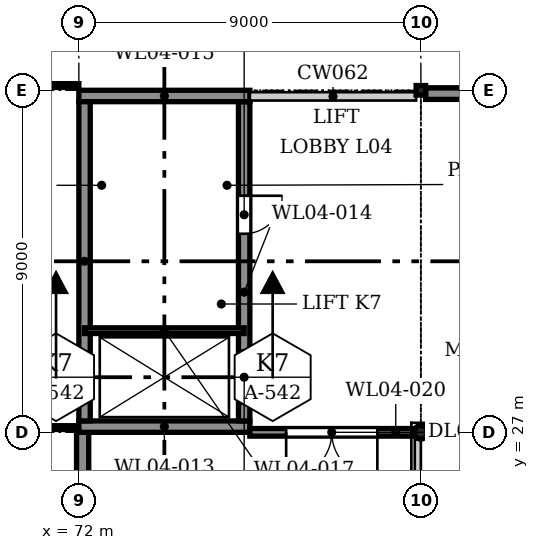
"""IFC4 building model, lengths in metres.
Left out: names, types, materials, properties, quantities, classifications, styles, units other than length and angle.
Written with IfcOpenShell. Run it as: python <this file> out.ifc"""

import sys

from ifc_helpers import new_model, si_unit, direction, frame, frame_2d, origin, origin_2d, place, context, subcontext, project, spatial, polyline, rectangle, hollow_rectangle, hollow_circle, outline, extrude, element, fill, save


model = new_model("IFC4")
c1 = context("Model", 3, precision=1e-05, world=origin(), true_north=direction((0.0, 1.0)))
c2 = subcontext(c1, "Body", "Model", "MODEL_VIEW")
j1 = project(units=[si_unit("LENGTHUNIT", "METRE"), si_unit("PLANEANGLEUNIT", "RADIAN")], contexts=[c1])
p1 = place(None, origin())
s1 = spatial("IfcSite", under=j1, at=p1, CompositionType="ELEMENT")
p2 = place(p1, origin())
s2 = spatial("IfcBuilding", under=s1, at=p2, CompositionType="ELEMENT")
p3 = place(p2, frame((0.0, 0.0, 21.2)))
s3 = spatial("IfcBuildingStorey", under=s2, at=p3, CompositionType="ELEMENT", Elevation=21.2)
p4 = place(p3, frame((81.0, 27.0, 0.0), z_axis=(0.0, 0.0, 1.0), x_axis=(1.0, 0.0, 0.0)))
e1 = element("IfcColumn", 1, at=p4, inside=s3, PredefinedType="COLUMN", context=c2, shape_type="SweptSolid", body=[
    extrude(hollow_circle(Radius=0.178, WallThickness=0.013, at=origin_2d()), origin(), (0.0, 0.0, 1.0), 3.6),
])
p5 = place(p3, frame((81.0, 36.0, 0.0), z_axis=(0.0, 0.0, 1.0), x_axis=(1.0, 0.0, 0.0)))
e2 = element("IfcColumn", 2, at=p5, inside=s3, PredefinedType="COLUMN", context=c2, shape_type="SweptSolid", body=[
    extrude(hollow_rectangle(XDim=0.25, YDim=0.25, WallThickness=0.01, InnerFilletRadius=0.015, OuterFilletRadius=0.025, at=origin_2d()), origin(), (0.0, 0.0, 1.0), 3.4),
])
p6 = place(p3, frame((81.125, 35.91, 0.0), z_axis=(0.0, 0.0, 1.0), x_axis=(1.0, 0.0, 0.0)))
e3 = element("IfcWall", 3, at=p6, inside=s3, PredefinedType="SOLIDWALL", context=c2, shape_type="SweptSolid", body=[
    extrude(rectangle(XDim=8.775, YDim=0.3, at=frame_2d((4.387, 0.0))), origin(), (0.0, 0.0, 1.0), 3.42),
])
p7 = place(p3, frame((81.125, 35.91, 3.878), z_axis=(0.0, 0.0, 1.0), x_axis=(1.0, 0.0, 0.0)))
e4 = element("IfcWall", 4, at=p7, inside=s3, PredefinedType="PARAPET", context=c2, shape_type="SweptSolid", body=[
    extrude(rectangle(XDim=8.775, YDim=0.2, at=frame_2d((4.387, 0.0))), origin(), (0.0, 0.0, 1.0), 0.522),
])
p8 = place(p3, frame((72.1, 18.125, 0.0), z_axis=(0.0, 0.0, 1.0), x_axis=(0.0, 1.0, 0.0)))
e5 = element("IfcWall", 5, at=p8, inside=s3, PredefinedType="SOLIDWALL", context=c2, shape_type="SweptSolid", body=[
    extrude(rectangle(XDim=8.875, YDim=0.32, at=frame_2d((4.438, 0.0))), origin(), (0.0, 0.0, 1.0), 3.878),
])
p9 = place(p3, frame((76.5, 35.96, 3.878), z_axis=(0.0, 0.0, 1.0), x_axis=(1.0, 0.0, 0.0)))
e6 = element("IfcWall", 6, at=p9, inside=s3, PredefinedType="PARAPET", context=c2, shape_type="SweptSolid", body=[
    extrude(rectangle(XDim=4.375, YDim=0.2, at=frame_2d((2.188, 0.0))), origin(), (0.0, 0.0, 1.0), 0.522),
])
p10 = place(p3, frame((27.0, 27.125, -0.146), z_axis=(0.0, 0.0, 1.0), x_axis=(1.0, 0.0, 0.0)))
e7 = element("IfcWall", 7, at=p10, inside=s3, PredefinedType="SOLIDWALL", context=c2, shape_type="SweptSolid", body=[
    extrude(rectangle(XDim=45.0, YDim=0.1, at=frame_2d((22.5, 0.0))), origin(), (0.0, 0.0, 1.0), 1.746),
])
p11 = place(p10, frame((0.45, 0.0, 0.15)))
e8 = element("IfcOpeningElement", 8, at=p11, cuts=e7, PredefinedType="OPENING", context=c2, shape_type="SweptSolid", body=[
    extrude(rectangle(XDim=3.6, YDim=1.0, at=frame_2d((1.8, 0.5))), frame((0.0, 0.06, 0.0), z_axis=(0.0, -1.0, 0.0), x_axis=(1.0, 0.0, 0.0)), (0.0, 0.0, 1.0), 0.12),
])
p12 = place(p10, frame((4.95, 0.0, 0.15)))
e9 = element("IfcOpeningElement", 9, at=p12, cuts=e7, PredefinedType="OPENING", context=c2, shape_type="SweptSolid", body=[
    extrude(rectangle(XDim=3.6, YDim=1.0, at=frame_2d((1.8, 0.5))), frame((0.0, 0.06, 0.0), z_axis=(0.0, -1.0, 0.0), x_axis=(1.0, 0.0, 0.0)), (0.0, 0.0, 1.0), 0.12),
])
p13 = place(p10, frame((9.45, 0.0, 0.15)))
e10 = element("IfcOpeningElement", 10, at=p13, cuts=e7, PredefinedType="OPENING", context=c2, shape_type="SweptSolid", body=[
    extrude(rectangle(XDim=3.6, YDim=1.0, at=frame_2d((1.8, 0.5))), frame((0.0, 0.06, 0.0), z_axis=(0.0, -1.0, 0.0), x_axis=(1.0, 0.0, 0.0)), (0.0, 0.0, 1.0), 0.12),
])
p14 = place(p10, frame((13.95, 0.0, 0.15)))
e11 = element("IfcOpeningElement", 11, at=p14, cuts=e7, PredefinedType="OPENING", context=c2, shape_type="SweptSolid", body=[
    extrude(rectangle(XDim=3.6, YDim=1.0, at=frame_2d((1.8, 0.5))), frame((0.0, 0.06, 0.0), z_axis=(0.0, -1.0, 0.0), x_axis=(1.0, 0.0, 0.0)), (0.0, 0.0, 1.0), 0.12),
])
p15 = place(p10, frame((18.45, 0.0, 0.15)))
e12 = element("IfcOpeningElement", 12, at=p15, cuts=e7, PredefinedType="OPENING", context=c2, shape_type="SweptSolid", body=[
    extrude(rectangle(XDim=3.6, YDim=1.0, at=frame_2d((1.8, 0.5))), frame((0.0, 0.06, 0.0), z_axis=(0.0, -1.0, 0.0), x_axis=(1.0, 0.0, 0.0)), (0.0, 0.0, 1.0), 0.12),
])
p16 = place(p10, frame((22.95, 0.0, 0.15)))
e13 = element("IfcOpeningElement", 13, at=p16, cuts=e7, PredefinedType="OPENING", context=c2, shape_type="SweptSolid", body=[
    extrude(rectangle(XDim=3.6, YDim=1.0, at=frame_2d((1.8, 0.5))), frame((0.0, 0.06, 0.0), z_axis=(0.0, -1.0, 0.0), x_axis=(1.0, 0.0, 0.0)), (0.0, 0.0, 1.0), 0.12),
])
p17 = place(p10, frame((27.45, 0.0, 0.15)))
e14 = element("IfcOpeningElement", 14, at=p17, cuts=e7, PredefinedType="OPENING", context=c2, shape_type="SweptSolid", body=[
    extrude(rectangle(XDim=3.6, YDim=1.0, at=frame_2d((1.8, 0.5))), frame((0.0, 0.06, 0.0), z_axis=(0.0, -1.0, 0.0), x_axis=(1.0, 0.0, 0.0)), (0.0, 0.0, 1.0), 0.12),
])
p18 = place(p10, frame((31.95, 0.0, 0.15)))
e15 = element("IfcOpeningElement", 15, at=p18, cuts=e7, PredefinedType="OPENING", context=c2, shape_type="SweptSolid", body=[
    extrude(rectangle(XDim=3.6, YDim=1.0, at=frame_2d((1.8, 0.5))), frame((0.0, 0.06, 0.0), z_axis=(0.0, -1.0, 0.0), x_axis=(1.0, 0.0, 0.0)), (0.0, 0.0, 1.0), 0.12),
])
p19 = place(p10, frame((36.45, 0.0, 0.15)))
e16 = element("IfcOpeningElement", 16, at=p19, cuts=e7, PredefinedType="OPENING", context=c2, shape_type="SweptSolid", body=[
    extrude(rectangle(XDim=3.6, YDim=1.0, at=frame_2d((1.8, 0.5))), frame((0.0, 0.06, 0.0), z_axis=(0.0, -1.0, 0.0), x_axis=(1.0, 0.0, 0.0)), (0.0, 0.0, 1.0), 0.12),
])
p20 = place(p10, frame((40.95, 0.0, 0.15)))
e17 = element("IfcOpeningElement", 17, at=p20, cuts=e7, PredefinedType="OPENING", context=c2, shape_type="SweptSolid", body=[
    extrude(rectangle(XDim=3.6, YDim=1.0, at=frame_2d((1.8, 0.5))), frame((0.0, 0.06, 0.0), z_axis=(0.0, -1.0, 0.0), x_axis=(1.0, 0.0, 0.0)), (0.0, 0.0, 1.0), 0.12),
])
p21 = place(p3, frame((62.85, 36.125, -0.122), z_axis=(0.0, 0.0, 1.0), x_axis=(1.0, 0.0, 0.0)))
e18 = element("IfcWall", 18, at=p21, inside=s3, PredefinedType="SOLIDWALL", context=c2, shape_type="SweptSolid", body=[
    extrude(rectangle(XDim=9.15, YDim=0.1, at=frame_2d((4.575, 0.0))), origin(), (0.0, 0.0, 1.0), 1.722),
])
p22 = place(p21, frame((0.6, 0.0, 0.15)))
e19 = element("IfcOpeningElement", 19, at=p22, cuts=e18, PredefinedType="OPENING", context=c2, shape_type="SweptSolid", body=[
    extrude(rectangle(XDim=3.6, YDim=1.0, at=frame_2d((1.8, 0.5))), frame((0.0, 0.06, 0.0), z_axis=(0.0, -1.0, 0.0), x_axis=(1.0, 0.0, 0.0)), (0.0, 0.0, 1.0), 0.12),
])
p23 = place(p21, frame((5.1, 0.0, 0.15)))
e20 = element("IfcOpeningElement", 20, at=p23, cuts=e18, PredefinedType="OPENING", context=c2, shape_type="SweptSolid", body=[
    extrude(rectangle(XDim=3.6, YDim=1.0, at=frame_2d((1.8, 0.5))), frame((0.0, 0.06, 0.0), z_axis=(0.0, -1.0, 0.0), x_axis=(1.0, 0.0, 0.0)), (0.0, 0.0, 1.0), 0.12),
])
p24 = place(p3, frame((72.1, 18.189, 3.878), z_axis=(0.0, 0.0, 1.0), x_axis=(0.0, 1.0, 0.0)))
e21 = element("IfcWall", 21, at=p24, inside=s3, PredefinedType="SOLIDWALL", context=c2, shape_type="SweptSolid", body=[
    extrude(outline(polyline([(0.0, 0.0), (8.811, 0.0), (8.811, 0.05), (0.0, 1.6), (0.0, 0.0)])), frame((0.0, 0.05, 0.0), z_axis=(0.0, -1.0, 0.0), x_axis=(1.0, 0.0, 0.0)), (0.0, 0.0, 1.0), 0.1),
])
p25 = place(p3, frame((72.0, 27.15, 0.0), z_axis=(0.0, 0.0, 1.0), x_axis=(1.0, 0.0, 0.0)))
e22 = element("IfcWall", 22, at=p25, inside=s3, PredefinedType="SOLIDWALL", context=c2, shape_type="SweptSolid", body=[
    extrude(rectangle(XDim=4.5, YDim=0.3, at=frame_2d((2.25, 0.0))), origin(), (0.0, 0.0, 1.0), 3.628),
])
p26 = place(p3, frame((76.35, 27.3, 0.0), z_axis=(0.0, 0.0, 1.0), x_axis=(0.0, 1.0, 0.0)))
e23 = element("IfcWall", 23, at=p26, inside=s3, PredefinedType="SOLIDWALL", context=c2, shape_type="SweptSolid", body=[
    extrude(rectangle(XDim=8.4, YDim=0.3, at=frame_2d((4.2, 0.0))), origin(), (0.0, 0.0, 1.0), 3.628),
])
p27 = place(p26, frame((0.45, 0.0, 0.0)))
e24 = element("IfcOpeningElement", 24, at=p27, cuts=e23, PredefinedType="OPENING", context=c2, shape_type="SweptSolid", body=[
    extrude(rectangle(XDim=1.4, YDim=2.1, at=frame_2d((0.7, 1.05))), frame((0.0, 0.16, 0.0), z_axis=(0.0, -1.0, 0.0), x_axis=(1.0, 0.0, 0.0)), (0.0, 0.0, 1.0), 0.32),
])
p28 = place(p26, frame((4.925, 0.0, 0.0)))
e25 = element("IfcOpeningElement", 25, at=p28, cuts=e23, PredefinedType="OPENING", context=c2, shape_type="SweptSolid", body=[
    extrude(rectangle(XDim=1.0, YDim=2.1, at=frame_2d((0.5, 1.05))), frame((0.0, 0.16, 0.0), z_axis=(0.0, -1.0, 0.0), x_axis=(1.0, 0.0, 0.0)), (0.0, 0.0, 1.0), 0.32),
])
p29 = place(p3, frame((72.0, 35.85, 0.0), z_axis=(0.0, 0.0, 1.0), x_axis=(1.0, 0.0, 0.0)))
e26 = element("IfcWall", 26, at=p29, inside=s3, PredefinedType="SOLIDWALL", context=c2, shape_type="SweptSolid", body=[
    extrude(rectangle(XDim=4.5, YDim=0.3, at=frame_2d((2.25, 0.0))), origin(), (0.0, 0.0, 1.0), 3.628),
])
p30 = place(p3, frame((72.15, 27.3, 0.0), z_axis=(0.0, 0.0, 1.0), x_axis=(0.0, 1.0, 0.0)))
e27 = element("IfcWall", 27, at=p30, inside=s3, PredefinedType="SOLIDWALL", context=c2, shape_type="SweptSolid", body=[
    extrude(rectangle(XDim=8.4, YDim=0.3, at=frame_2d((4.2, 0.0))), origin(), (0.0, 0.0, 1.0), 3.628),
])
p31 = place(p3, frame((72.15, 29.675, 0.0), z_axis=(0.0, 0.0, 1.0), x_axis=(1.0, 0.0, 0.0)))
e28 = element("IfcWall", 28, at=p31, inside=s3, PredefinedType="SOLIDWALL", context=c2, shape_type="SweptSolid", body=[
    extrude(rectangle(XDim=4.2, YDim=0.15, at=frame_2d((2.1, 0.0))), origin(), (0.0, 0.0, 1.0), 3.628),
])
p32 = place(p3, frame((76.5, 27.0, 0.0), z_axis=(0.0, 0.0, 1.0), x_axis=(1.0, 0.0, 0.0)))
e29 = element("IfcWall", 29, at=p32, inside=s3, PredefinedType="PARTITIONING", context=c2, shape_type="SweptSolid", body=[
    extrude(rectangle(XDim=4.322, YDim=0.2, at=frame_2d((2.161, 0.0))), origin(), (0.0, 0.0, 1.0), 3.54),
])
p33 = place(p32, frame((0.955, 0.0, 0.0)))
e30 = element("IfcOpeningElement", 30, at=p33, cuts=e29, PredefinedType="OPENING", context=c2, shape_type="SweptSolid", body=[
    extrude(rectangle(XDim=2.4, YDim=2.4, at=frame_2d((1.2, 1.2))), frame((0.0, 0.11, 0.0), z_axis=(0.0, -1.0, 0.0), x_axis=(1.0, 0.0, 0.0)), (0.0, 0.0, 1.0), 0.22),
])
p34 = place(p2, frame((0.0, 0.0, 25.2)))
p35 = place(p34, frame((76.85, 27.125, -0.146), z_axis=(0.0, 0.0, 1.0), x_axis=(1.0, 0.0, 0.0)))
p36 = place(p35, frame((4.6, 0.0, 0.15)))
p37 = place(p36, origin())
e31 = element("IfcWindow", 31, at=p37, inside=s3, PartitioningType="SINGLE_PANEL", PredefinedType="SKYLIGHT", context=c2, shape_type="SweptSolid", body=[
    extrude(rectangle(XDim=3.6, YDim=1.0, at=frame_2d((1.8, 0.5))), frame((0.0, 0.03, 0.0), z_axis=(0.0, -1.0, 0.0), x_axis=(1.0, 0.0, 0.0)), (0.0, 0.0, 1.0), 0.06),
])
p38 = place(p27, origin())
e32 = element("IfcDoor", 32, at=p38, inside=s3, OperationType="SLIDING_TO_LEFT", PredefinedType="DOOR", context=c2, shape_type="SweptSolid", body=[
    extrude(rectangle(XDim=1.4, YDim=2.1, at=frame_2d((0.7, 1.05))), frame((0.0, 0.025, 0.0), z_axis=(0.0, -1.0, 0.0), x_axis=(1.0, 0.0, 0.0)), (0.0, 0.0, 1.0), 0.05),
])
fill(e24, e32)
p39 = place(p28, frame((1.0, 0.0, 0.0), z_axis=(0.0, 0.0, 1.0), x_axis=(-1.0, 0.0, 0.0)))
e33 = element("IfcDoor", 33, at=p39, inside=s3, OperationType="SINGLE_SWING_RIGHT", PredefinedType="DOOR", context=c2, shape_type="SweptSolid", body=[
    extrude(rectangle(XDim=1.0, YDim=2.1, at=frame_2d((0.5, 1.05))), frame((0.0, 0.025, 0.0), z_axis=(0.0, -1.0, 0.0), x_axis=(1.0, 0.0, 0.0)), (0.0, 0.0, 1.0), 0.05),
])
fill(e25, e33)
p40 = place(p33, frame((2.4, 0.0, 0.0), z_axis=(0.0, 0.0, 1.0), x_axis=(-1.0, 0.0, 0.0)))
e34 = element("IfcDoor", 34, at=p40, inside=s3, OperationType="DOUBLE_DOOR_SINGLE_SWING", PredefinedType="DOOR", context=c2, shape_type="SweptSolid", body=[
    extrude(rectangle(XDim=2.4, YDim=2.4, at=frame_2d((1.2, 1.2))), frame((0.0, 0.025, 0.0), z_axis=(0.0, -1.0, 0.0), x_axis=(1.0, 0.0, 0.0)), (0.0, 0.0, 1.0), 0.05),
])
fill(e30, e34)
save(model, sys.argv[1])
